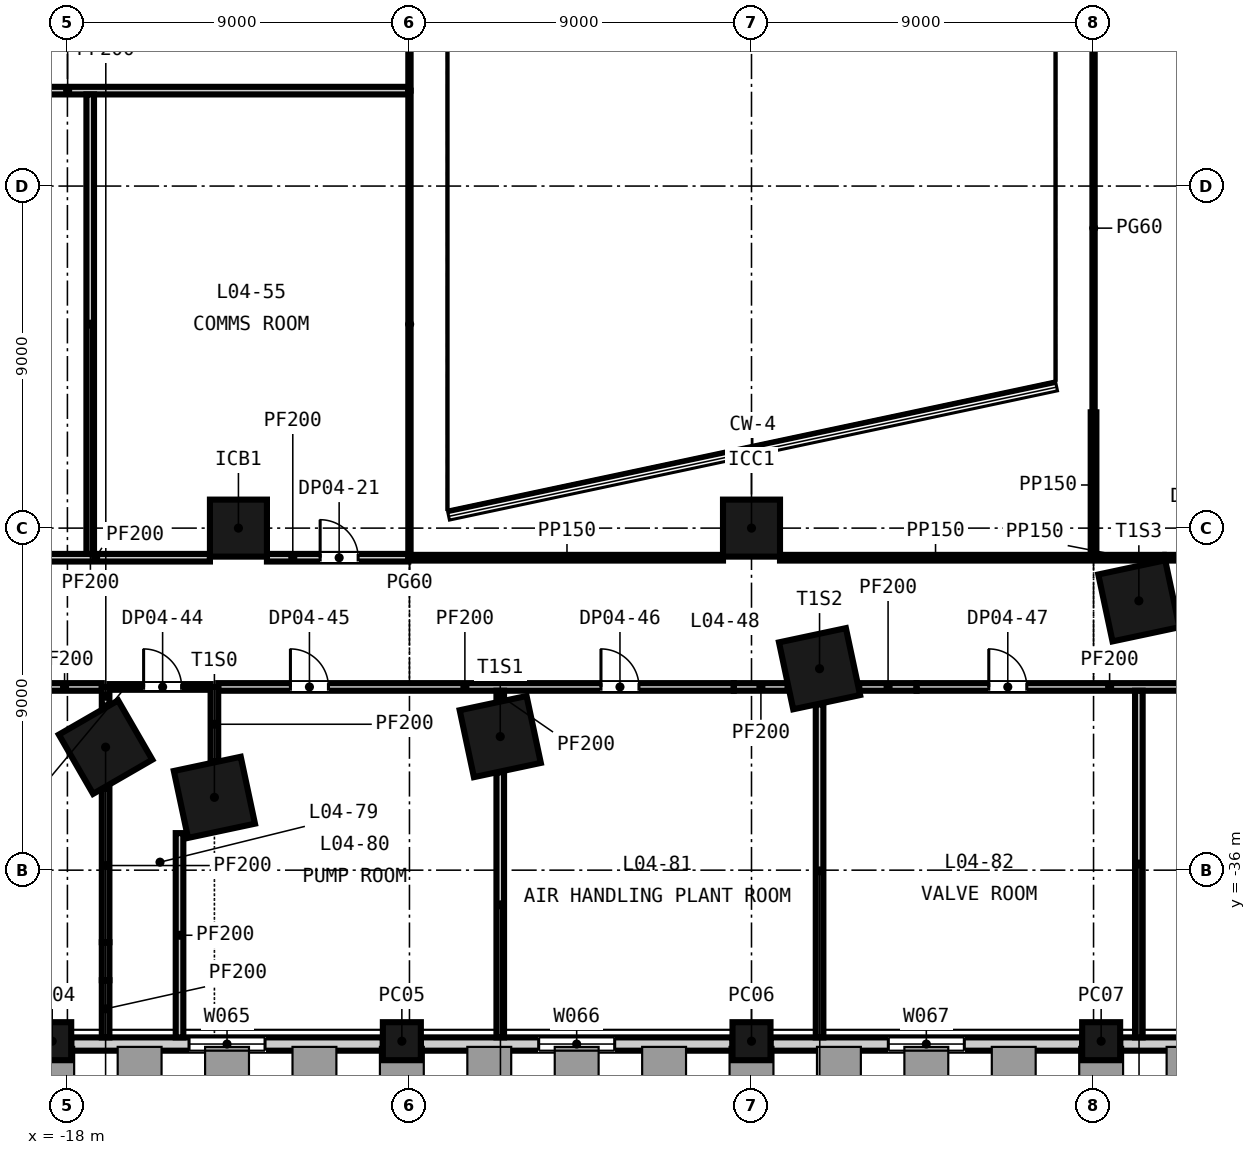
"""IFC4 building model, lengths in metres.
Left out: names, types, materials, properties, quantities, classifications, styles, units other than length and angle.
Written with IfcOpenShell. Run it as: python <this file> out.ifc"""

import sys

from ifc_helpers import new_model, si_unit, direction, frame, frame_2d, origin, origin_2d, place, context, subcontext, project, spatial, rectangle, extrude, element, fill, save


model = new_model("IFC4")
c1 = context("Model", 3, precision=1e-05, world=origin(), true_north=direction((0.0, 1.0)))
c2 = subcontext(c1, "Body", "Model", "MODEL_VIEW")
j1 = project(units=[si_unit("LENGTHUNIT", "METRE"), si_unit("PLANEANGLEUNIT", "RADIAN")], contexts=[c1])
p1 = place(None, origin())
s1 = spatial("IfcSite", under=j1, at=p1, CompositionType="ELEMENT")
p2 = place(p1, origin())
s2 = spatial("IfcBuilding", under=s1, at=p2, CompositionType="ELEMENT")
p3 = place(p2, frame((0.0, 0.0, 27.0)))
s3 = spatial("IfcBuildingStorey", under=s2, at=p3, CompositionType="ELEMENT", Elevation=27.0)
for number, where, z_axis, x_axis in (
    (1, (-16.995, -32.763, -0.3), (0.0, 0.0, 1.0), (0.5, -0.866, 0.0)),
    (2, (-14.132, -34.084, -0.3), (0.0, 0.0, 1.0), (0.978, 0.208, 0.0)),
    (3, (-6.611, -32.485, -0.3), (0.0, 0.0, 1.0), (0.978, 0.208, 0.0)),
    (4, (1.791, -30.699, -0.3), (0.0, 0.0, 1.0), (0.978, 0.208, 0.0)),
    (5, (10.192, -28.914, -0.3), (0.0, 0.0, 1.0), (0.978, 0.208, 0.0)),
):
    element("IfcColumn", number, at=place(p3, frame(where, z_axis=z_axis, x_axis=x_axis)), inside=s3, PredefinedType="COLUMN", context=c2, shape_type="SweptSolid", body=[
        extrude(rectangle(XDim=1.8, YDim=1.8, at=origin_2d()), origin(), (0.0, 0.0, 1.0), 4.5),
    ])
for number, where, z_axis, x_axis in (
    (6, (-13.5, -27.0, -0.3), (0.0, 0.0, 1.0), (1.0, 0.0, 0.0)),
    (7, (0.0, -27.0, -0.3), (0.0, 0.0, 1.0), (1.0, 0.0, 0.0)),
):
    element("IfcColumn", number, at=place(p3, frame(where, z_axis=z_axis, x_axis=x_axis)), inside=s3, PredefinedType="COLUMN", context=c2, shape_type="SweptSolid", body=[
        extrude(rectangle(XDim=1.5, YDim=1.5, at=origin_2d()), origin(), (0.0, 0.0, 1.0), 4.5),
    ])
for number, where, z_axis, x_axis in (
    (8, (-18.4, -40.5, -0.3), (0.0, 0.0, 1.0), (1.0, 0.0, 0.0)),
    (9, (-9.2, -40.5, -0.3), (0.0, 0.0, 1.0), (1.0, 0.0, 0.0)),
    (10, (0.0, -40.5, -0.3), (0.0, 0.0, 1.0), (1.0, 0.0, 0.0)),
    (11, (9.2, -40.5, -0.3), (0.0, 0.0, 1.0), (1.0, 0.0, 0.0)),
):
    element("IfcColumn", number, at=place(p3, frame(where, z_axis=z_axis, x_axis=x_axis)), inside=s3, PredefinedType="COLUMN", context=c2, shape_type="SweptSolid", body=[
        extrude(rectangle(XDim=1.0, YDim=1.0, at=origin_2d()), origin(), (0.0, 0.0, 1.0), 4.5),
    ])
p4 = place(p3, frame((-17.9, -40.575, -0.3), z_axis=(0.0, 0.0, 1.0), x_axis=(1.0, 0.0, 0.0)))
e12 = element("IfcWall", 12, at=p4, inside=s3, PredefinedType="SOLIDWALL", context=c2, shape_type="SweptSolid", body=[
    extrude(rectangle(XDim=8.2, YDim=0.35, at=frame_2d((4.1, 0.0))), origin(), (0.0, 0.0, 1.0), 3.6),
])
p5 = place(p4, frame((3.1, 0.0, 1.2)))
e13 = element("IfcOpeningElement", 13, at=p5, cuts=e12, PredefinedType="OPENING", context=c2, shape_type="SweptSolid", body=[
    extrude(rectangle(XDim=2.0, YDim=2.35, at=frame_2d((1.0, 1.175))), frame((0.0, 0.185, 0.0), z_axis=(0.0, -1.0, 0.0), x_axis=(1.0, 0.0, 0.0)), (0.0, 0.0, 1.0), 0.37),
])
p6 = place(p3, frame((-8.7, -40.575, -0.3), z_axis=(0.0, 0.0, 1.0), x_axis=(1.0, 0.0, 0.0)))
e14 = element("IfcWall", 14, at=p6, inside=s3, PredefinedType="SOLIDWALL", context=c2, shape_type="SweptSolid", body=[
    extrude(rectangle(XDim=8.2, YDim=0.35, at=frame_2d((4.1, 0.0))), origin(), (0.0, 0.0, 1.0), 3.6),
])
p7 = place(p6, frame((3.1, 0.0, 1.2)))
e15 = element("IfcOpeningElement", 15, at=p7, cuts=e14, PredefinedType="OPENING", context=c2, shape_type="SweptSolid", body=[
    extrude(rectangle(XDim=2.0, YDim=2.35, at=frame_2d((1.0, 1.175))), frame((0.0, 0.185, 0.0), z_axis=(0.0, -1.0, 0.0), x_axis=(1.0, 0.0, 0.0)), (0.0, 0.0, 1.0), 0.37),
])
p8 = place(p3, frame((0.5, -40.575, -0.3), z_axis=(0.0, 0.0, 1.0), x_axis=(1.0, 0.0, 0.0)))
e16 = element("IfcWall", 16, at=p8, inside=s3, PredefinedType="SOLIDWALL", context=c2, shape_type="SweptSolid", body=[
    extrude(rectangle(XDim=8.2, YDim=0.35, at=frame_2d((4.1, 0.0))), origin(), (0.0, 0.0, 1.0), 3.6),
])
p9 = place(p8, frame((3.1, 0.0, 1.2)))
e17 = element("IfcOpeningElement", 17, at=p9, cuts=e16, PredefinedType="OPENING", context=c2, shape_type="SweptSolid", body=[
    extrude(rectangle(XDim=2.0, YDim=2.35, at=frame_2d((1.0, 1.175))), frame((0.0, 0.185, 0.0), z_axis=(0.0, -1.0, 0.0), x_axis=(1.0, 0.0, 0.0)), (0.0, 0.0, 1.0), 0.37),
])
p10 = place(p3, frame((9.7, -40.575, -0.3), z_axis=(0.0, 0.0, 1.0), x_axis=(1.0, 0.0, 0.0)))
e18 = element("IfcWall", 18, at=p10, inside=s3, PredefinedType="SOLIDWALL", context=c2, shape_type="SweptSolid", body=[
    extrude(rectangle(XDim=8.2, YDim=0.35, at=frame_2d((4.1, 0.0))), origin(), (0.0, 0.0, 1.0), 3.6),
])
p11 = place(p10, frame((3.1, 0.0, 1.2)))
e19 = element("IfcOpeningElement", 19, at=p11, cuts=e18, PredefinedType="OPENING", context=c2, shape_type="SweptSolid", body=[
    extrude(rectangle(XDim=2.0, YDim=2.35, at=frame_2d((1.0, 1.175))), frame((0.0, 0.185, 0.0), z_axis=(0.0, -1.0, 0.0), x_axis=(1.0, 0.0, 0.0)), (0.0, 0.0, 1.0), 0.37),
])
p12 = place(p3, frame((-19.065, -31.179, 0.0), z_axis=(0.0, 0.0, 1.0), x_axis=(1.0, 0.0, 0.0)))
e20 = element("IfcWall", 20, at=p12, inside=s3, PredefinedType="PARTITIONING", context=c2, shape_type="SweptSolid", body=[
    extrude(rectangle(XDim=1.97, YDim=0.2, at=frame_2d((0.985, 0.0))), origin(), (0.0, 0.0, 1.0), 3.2),
])
p13 = place(p3, frame((-16.895, -31.179, 0.0), z_axis=(0.0, 0.0, 1.0), x_axis=(1.0, 0.0, 0.0)))
e21 = element("IfcWall", 21, at=p13, inside=s3, PredefinedType="PARTITIONING", context=c2, shape_type="SweptSolid", body=[
    extrude(rectangle(XDim=2.663, YDim=0.15, at=frame_2d((1.332, 0.0))), origin(), (0.0, 0.0, 1.0), 4.2),
])
p14 = place(p13, frame((0.9, 0.0, 0.0)))
e22 = element("IfcOpeningElement", 22, at=p14, cuts=e21, PredefinedType="OPENING", context=c2, shape_type="SweptSolid", body=[
    extrude(rectangle(XDim=1.0, YDim=2.1, at=frame_2d((0.5, 1.05))), frame((0.0, 0.085, 0.0), z_axis=(0.0, -1.0, 0.0), x_axis=(1.0, 0.0, 0.0)), (0.0, 0.0, 1.0), 0.17),
])
p15 = place(p3, frame((-14.032, -31.179, 0.0), z_axis=(0.0, 0.0, 1.0), x_axis=(1.0, 0.0, 0.0)))
e23 = element("IfcWall", 23, at=p15, inside=s3, PredefinedType="PARTITIONING", context=c2, shape_type="SweptSolid", body=[
    extrude(rectangle(XDim=13.566, YDim=0.2, at=frame_2d((6.783, 0.0))), origin(), (0.0, 0.0, 1.0), 4.2),
])
p16 = place(p15, frame((1.9, 0.0, 0.0)))
e24 = element("IfcOpeningElement", 24, at=p16, cuts=e23, PredefinedType="OPENING", context=c2, shape_type="SweptSolid", body=[
    extrude(rectangle(XDim=1.0, YDim=2.1, at=frame_2d((0.5, 1.05))), frame((0.0, 0.11, 0.0), z_axis=(0.0, -1.0, 0.0), x_axis=(1.0, 0.0, 0.0)), (0.0, 0.0, 1.0), 0.22),
])
p17 = place(p15, frame((10.071, 0.0, 0.0)))
e25 = element("IfcOpeningElement", 25, at=p17, cuts=e23, PredefinedType="OPENING", context=c2, shape_type="SweptSolid", body=[
    extrude(rectangle(XDim=1.0, YDim=2.1, at=frame_2d((0.5, 1.05))), frame((0.0, 0.11, 0.0), z_axis=(0.0, -1.0, 0.0), x_axis=(1.0, 0.0, 0.0)), (0.0, 0.0, 1.0), 0.22),
])
p18 = place(p3, frame((-0.466, -31.179, 0.0), z_axis=(0.0, 0.0, 1.0), x_axis=(1.0, 0.0, 0.0)))
e26 = element("IfcWall", 26, at=p18, inside=s3, PredefinedType="PARTITIONING", context=c2, shape_type="SweptSolid", body=[
    extrude(rectangle(XDim=1.417, YDim=0.2, at=frame_2d((0.709, 0.0))), origin(), (0.0, 0.0, 1.0), 3.2),
])
p19 = place(p3, frame((2.834, -31.179, 0.0), z_axis=(0.0, 0.0, 1.0), x_axis=(1.0, 0.0, 0.0)))
e27 = element("IfcWall", 27, at=p19, inside=s3, PredefinedType="PARTITIONING", context=c2, shape_type="SweptSolid", body=[
    extrude(rectangle(XDim=1.51, YDim=0.2, at=frame_2d((0.755, 0.0))), origin(), (0.0, 0.0, 1.0), 3.2),
])
p20 = place(p3, frame((4.344, -31.179, 0.0), z_axis=(0.0, 0.0, 1.0), x_axis=(1.0, 0.0, 0.0)))
e28 = element("IfcWall", 28, at=p20, inside=s3, PredefinedType="PARTITIONING", context=c2, shape_type="SweptSolid", body=[
    extrude(rectangle(XDim=9.718, YDim=0.2, at=frame_2d((4.859, 0.0))), origin(), (0.0, 0.0, 1.0), 4.2),
])
p21 = place(p20, frame((1.9, 0.0, 0.0)))
e29 = element("IfcOpeningElement", 29, at=p21, cuts=e28, PredefinedType="OPENING", context=c2, shape_type="SweptSolid", body=[
    extrude(rectangle(XDim=1.0, YDim=2.1, at=frame_2d((0.5, 1.05))), frame((0.0, 0.11, 0.0), z_axis=(0.0, -1.0, 0.0), x_axis=(1.0, 0.0, 0.0)), (0.0, 0.0, 1.0), 0.22),
])
p22 = place(p20, frame((7.249, 0.0, 0.0)))
e30 = element("IfcOpeningElement", 30, at=p22, cuts=e28, PredefinedType="OPENING", context=c2, shape_type="SweptSolid", body=[
    extrude(rectangle(XDim=1.0, YDim=2.1, at=frame_2d((0.5, 1.05))), frame((0.0, 0.11, 0.0), z_axis=(0.0, -1.0, 0.0), x_axis=(1.0, 0.0, 0.0)), (0.0, 0.0, 1.0), 0.22),
])
p23 = place(p3, frame((-20.276, -27.779, 0.0), z_axis=(0.0, 0.0, 1.0), x_axis=(1.0, 0.0, 0.0)))
e31 = element("IfcWall", 31, at=p23, inside=s3, PredefinedType="PARTITIONING", context=c2, shape_type="SweptSolid", body=[
    extrude(rectangle(XDim=6.026, YDim=0.2, at=frame_2d((3.013, 0.0))), origin(), (0.0, 0.0, 1.0), 4.2),
])
p24 = place(p3, frame((-12.75, -27.779, 0.0), z_axis=(0.0, 0.0, 1.0), x_axis=(1.0, 0.0, 0.0)))
e32 = element("IfcWall", 32, at=p24, inside=s3, PredefinedType="PARTITIONING", context=c2, shape_type="SweptSolid", body=[
    extrude(rectangle(XDim=3.72, YDim=0.2, at=frame_2d((1.86, 0.0))), origin(), (0.0, 0.0, 1.0), 4.2),
])
p25 = place(p24, frame((1.4, 0.0, 0.0)))
e33 = element("IfcOpeningElement", 33, at=p25, cuts=e32, PredefinedType="OPENING", context=c2, shape_type="SweptSolid", body=[
    extrude(rectangle(XDim=1.0, YDim=2.1, at=frame_2d((0.5, 1.05))), frame((0.0, 0.11, 0.0), z_axis=(0.0, -1.0, 0.0), x_axis=(1.0, 0.0, 0.0)), (0.0, 0.0, 1.0), 0.22),
])
p26 = place(p3, frame((-8.97, -27.779, 0.0), z_axis=(0.0, 0.0, 1.0), x_axis=(1.0, 0.0, 0.0)))
e34 = element("IfcWall", 34, at=p26, inside=s3, PredefinedType="PARTITIONING", context=c2, shape_type="SweptSolid", body=[
    extrude(rectangle(XDim=8.22, YDim=0.15, at=frame_2d((4.11, 0.0))), origin(), (0.0, 0.0, 1.0), 4.2),
])
p27 = place(p3, frame((0.75, -27.779, 0.0), z_axis=(0.0, 0.0, 1.0), x_axis=(1.0, 0.0, 0.0)))
e35 = element("IfcWall", 35, at=p27, inside=s3, PredefinedType="PARTITIONING", context=c2, shape_type="SweptSolid", body=[
    extrude(rectangle(XDim=8.175, YDim=0.15, at=frame_2d((4.087, 0.0))), origin(), (0.0, 0.0, 1.0), 4.2),
])
p28 = place(p3, frame((9.075, -27.779, 0.0), z_axis=(0.0, 0.0, 1.0), x_axis=(1.0, 0.0, 0.0)))
e36 = element("IfcWall", 36, at=p28, inside=s3, PredefinedType="PARTITIONING", context=c2, shape_type="SweptSolid", body=[
    extrude(rectangle(XDim=1.773, YDim=0.15, at=frame_2d((0.886, 0.0))), origin(), (0.0, 0.0, 1.0), 4.2),
])
p29 = place(p3, frame((10.887, -27.779, 0.0), z_axis=(0.0, 0.0, 1.0), x_axis=(1.0, 0.0, 0.0)))
e37 = element("IfcWall", 37, at=p29, inside=s3, PredefinedType="PARTITIONING", context=c2, shape_type="SweptSolid", body=[
    extrude(rectangle(XDim=4.762, YDim=0.15, at=frame_2d((2.381, 0.0))), origin(), (0.0, 0.0, 1.0), 4.2),
])
p30 = place(p3, frame((-26.969, -15.489, 0.0), z_axis=(0.0, 0.0, 1.0), x_axis=(1.0, 0.0, 0.0)))
e38 = element("IfcWall", 38, at=p30, inside=s3, PredefinedType="PARTITIONING", context=c2, shape_type="SweptSolid", body=[
    extrude(rectangle(XDim=17.938, YDim=0.2, at=frame_2d((8.969, 0.0))), origin(), (0.0, 0.0, 1.0), 4.2),
])
p31 = place(p3, frame((-17.4, -27.679, 0.0), z_axis=(0.0, 0.0, 1.0), x_axis=(0.0, 1.0, 0.0)))
e39 = element("IfcWall", 39, at=p31, inside=s3, PredefinedType="PARTITIONING", context=c2, shape_type="SweptSolid", body=[
    extrude(rectangle(XDim=12.09, YDim=0.2, at=frame_2d((6.045, 0.0))), origin(), (0.0, 0.0, 1.0), 4.2),
])
p32 = place(p3, frame((-16.995, -40.4, 0.0), z_axis=(0.0, 0.0, 1.0), x_axis=(0.0, 1.0, 0.0)))
e40 = element("IfcWall", 40, at=p32, inside=s3, PredefinedType="PARTITIONING", context=c2, shape_type="SweptSolid", body=[
    extrude(rectangle(XDim=1.504, YDim=0.2, at=frame_2d((0.752, 0.0))), origin(), (0.0, 0.0, 1.0), 4.2),
])
p33 = place(p3, frame((-16.995, -38.896, 0.0), z_axis=(0.0, 0.0, 1.0), x_axis=(0.0, 1.0, 0.0)))
e41 = element("IfcWall", 41, at=p33, inside=s3, PredefinedType="PARTITIONING", context=c2, shape_type="SweptSolid", body=[
    extrude(rectangle(XDim=1.0, YDim=0.2, at=frame_2d((0.5, 0.0))), origin(), (0.0, 0.0, 1.0), 3.676),
])
p34 = place(p3, frame((-16.995, -37.896, 0.0), z_axis=(0.0, 0.0, 1.0), x_axis=(0.0, 1.0, 0.0)))
e42 = element("IfcWall", 42, at=p34, inside=s3, PredefinedType="PARTITIONING", context=c2, shape_type="SweptSolid", body=[
    extrude(rectangle(XDim=4.036, YDim=0.2, at=frame_2d((2.018, 0.0))), origin(), (0.0, 0.0, 1.0), 4.2),
])
p35 = place(p3, frame((-16.995, -31.666, 0.0), z_axis=(0.0, 0.0, 1.0), x_axis=(0.0, 1.0, 0.0)))
e43 = element("IfcWall", 43, at=p35, inside=s3, PredefinedType="PARTITIONING", context=c2, shape_type="SweptSolid", body=[
    extrude(rectangle(XDim=0.487, YDim=0.2, at=frame_2d((0.244, 0.0))), origin(), (0.0, 0.0, 1.0), 4.2),
])
p36 = place(p3, frame((-15.05, -40.4, 0.0), z_axis=(0.0, 0.0, 1.0), x_axis=(0.0, 1.0, 0.0)))
e44 = element("IfcWall", 44, at=p36, inside=s3, PredefinedType="PARTITIONING", context=c2, shape_type="SweptSolid", body=[
    extrude(rectangle(XDim=5.375, YDim=0.2, at=frame_2d((2.688, 0.0))), origin(), (0.0, 0.0, 1.0), 4.2),
])
p37 = place(p3, frame((-14.132, -33.142, 0.0), z_axis=(0.0, 0.0, 1.0), x_axis=(0.0, 1.0, 0.0)))
e45 = element("IfcWall", 45, at=p37, inside=s3, PredefinedType="PARTITIONING", context=c2, shape_type="SweptSolid", body=[
    extrude(rectangle(XDim=1.963, YDim=0.2, at=frame_2d((0.982, 0.0))), origin(), (0.0, 0.0, 1.0), 4.2),
])
p38 = place(p3, frame((-9.0, -27.778, 0.0), z_axis=(0.0, 0.0, 1.0), x_axis=(0.0, 1.0, 0.0)))
e46 = element("IfcWall", 46, at=p38, inside=s3, PredefinedType="PARTITIONING", context=c2, shape_type="SweptSolid", body=[
    extrude(rectangle(XDim=12.288, YDim=0.06, at=frame_2d((6.144, 0.0))), origin(), (0.0, 0.0, 1.0), 4.2),
])
p39 = place(p3, frame((-9.0, -15.489, 0.0), z_axis=(0.0, 0.0, 1.0), x_axis=(0.0, 1.0, 0.0)))
e47 = element("IfcWall", 47, at=p39, inside=s3, PredefinedType="PARTITIONING", context=c2, shape_type="SweptSolid", body=[
    extrude(rectangle(XDim=6.488, YDim=0.06, at=frame_2d((3.244, 0.0))), origin(), (0.0, 0.0, 1.0), 4.2),
])
p40 = place(p3, frame((-6.611, -40.4, 0.0), z_axis=(0.0, 0.0, 1.0), x_axis=(0.0, 1.0, 0.0)))
e48 = element("IfcWall", 48, at=p40, inside=s3, PredefinedType="PARTITIONING", context=c2, shape_type="SweptSolid", body=[
    extrude(rectangle(XDim=6.973, YDim=0.2, at=frame_2d((3.487, 0.0))), origin(), (0.0, 0.0, 1.0), 4.2),
])
p41 = place(p3, frame((-6.611, -31.544, 0.0), z_axis=(0.0, 0.0, 1.0), x_axis=(0.0, 1.0, 0.0)))
e49 = element("IfcWall", 49, at=p41, inside=s3, PredefinedType="PARTITIONING", context=c2, shape_type="SweptSolid", body=[
    extrude(rectangle(XDim=0.265, YDim=0.2, at=frame_2d((0.132, 0.0))), origin(), (0.0, 0.0, 1.0), 4.2),
])
p42 = place(p3, frame((1.791, -40.4, 0.0), z_axis=(0.0, 0.0, 1.0), x_axis=(0.0, 1.0, 0.0)))
e50 = element("IfcWall", 50, at=p42, inside=s3, PredefinedType="PARTITIONING", context=c2, shape_type="SweptSolid", body=[
    extrude(rectangle(XDim=8.759, YDim=0.2, at=frame_2d((4.38, 0.0))), origin(), (0.0, 0.0, 1.0), 4.2),
])
p43 = place(p3, frame((9.0, -27.778, 0.0), z_axis=(0.0, 0.0, 1.0), x_axis=(0.0, 1.0, 0.0)))
e51 = element("IfcWall", 51, at=p43, inside=s3, PredefinedType="PARTITIONING", context=c2, shape_type="SweptSolid", body=[
    extrude(rectangle(XDim=3.825, YDim=0.15, at=frame_2d((1.913, 0.0))), origin(), (0.0, 0.0, 1.0), 4.2),
])
p44 = place(p3, frame((9.0, -23.953, 0.0), z_axis=(0.0, 0.0, 1.0), x_axis=(0.0, 1.0, 0.0)))
e52 = element("IfcWall", 52, at=p44, inside=s3, PredefinedType="PARTITIONING", context=c2, shape_type="SweptSolid", body=[
    extrude(rectangle(XDim=9.691, YDim=0.06, at=frame_2d((4.846, 0.0))), origin(), (0.0, 0.0, 1.0), 4.2),
])
p45 = place(p3, frame((10.192, -40.4, 0.0), z_axis=(0.0, 0.0, 1.0), x_axis=(0.0, 1.0, 0.0)))
e53 = element("IfcWall", 53, at=p45, inside=s3, PredefinedType="PARTITIONING", context=c2, shape_type="SweptSolid", body=[
    extrude(rectangle(XDim=9.121, YDim=0.2, at=frame_2d((4.561, 0.0))), origin(), (0.0, 0.0, 1.0), 4.2),
])
p46 = place(p5, origin())
e54 = element("IfcWindow", 54, at=p46, inside=s3, PartitioningType="SINGLE_PANEL", PredefinedType="WINDOW", context=c2, shape_type="SweptSolid", body=[
    extrude(rectangle(XDim=2.0, YDim=2.35, at=frame_2d((1.0, 1.175))), frame((0.0, 0.03, 0.0), z_axis=(0.0, -1.0, 0.0), x_axis=(1.0, 0.0, 0.0)), (0.0, 0.0, 1.0), 0.06),
])
fill(e13, e54)
p47 = place(p7, origin())
e55 = element("IfcWindow", 55, at=p47, inside=s3, PartitioningType="SINGLE_PANEL", PredefinedType="WINDOW", context=c2, shape_type="SweptSolid", body=[
    extrude(rectangle(XDim=2.0, YDim=2.35, at=frame_2d((1.0, 1.175))), frame((0.0, 0.03, 0.0), z_axis=(0.0, -1.0, 0.0), x_axis=(1.0, 0.0, 0.0)), (0.0, 0.0, 1.0), 0.06),
])
fill(e15, e55)
p48 = place(p9, origin())
e56 = element("IfcWindow", 56, at=p48, inside=s3, PartitioningType="SINGLE_PANEL", PredefinedType="WINDOW", context=c2, shape_type="SweptSolid", body=[
    extrude(rectangle(XDim=2.0, YDim=2.35, at=frame_2d((1.0, 1.175))), frame((0.0, 0.03, 0.0), z_axis=(0.0, -1.0, 0.0), x_axis=(1.0, 0.0, 0.0)), (0.0, 0.0, 1.0), 0.06),
])
fill(e17, e56)
p49 = place(p25, origin())
e57 = element("IfcDoor", 57, at=p49, inside=s3, OperationType="SINGLE_SWING_LEFT", PredefinedType="DOOR", context=c2, shape_type="SweptSolid", body=[
    extrude(rectangle(XDim=1.0, YDim=2.1, at=frame_2d((0.5, 1.05))), frame((0.0, 0.025, 0.0), z_axis=(0.0, -1.0, 0.0), x_axis=(1.0, 0.0, 0.0)), (0.0, 0.0, 1.0), 0.05),
])
fill(e33, e57)
p50 = place(p14, origin())
e58 = element("IfcDoor", 58, at=p50, inside=s3, OperationType="SINGLE_SWING_LEFT", PredefinedType="DOOR", context=c2, shape_type="SweptSolid", body=[
    extrude(rectangle(XDim=1.0, YDim=2.1, at=frame_2d((0.5, 1.05))), frame((0.0, 0.025, 0.0), z_axis=(0.0, -1.0, 0.0), x_axis=(1.0, 0.0, 0.0)), (0.0, 0.0, 1.0), 0.05),
])
fill(e22, e58)
p51 = place(p16, origin())
e59 = element("IfcDoor", 59, at=p51, inside=s3, OperationType="SINGLE_SWING_LEFT", PredefinedType="DOOR", context=c2, shape_type="SweptSolid", body=[
    extrude(rectangle(XDim=1.0, YDim=2.1, at=frame_2d((0.5, 1.05))), frame((0.0, 0.025, 0.0), z_axis=(0.0, -1.0, 0.0), x_axis=(1.0, 0.0, 0.0)), (0.0, 0.0, 1.0), 0.05),
])
fill(e24, e59)
p52 = place(p17, origin())
e60 = element("IfcDoor", 60, at=p52, inside=s3, OperationType="SINGLE_SWING_LEFT", PredefinedType="DOOR", context=c2, shape_type="SweptSolid", body=[
    extrude(rectangle(XDim=1.0, YDim=2.1, at=frame_2d((0.5, 1.05))), frame((0.0, 0.025, 0.0), z_axis=(0.0, -1.0, 0.0), x_axis=(1.0, 0.0, 0.0)), (0.0, 0.0, 1.0), 0.05),
])
fill(e25, e60)
p53 = place(p21, origin())
e61 = element("IfcDoor", 61, at=p53, inside=s3, OperationType="SINGLE_SWING_LEFT", PredefinedType="DOOR", context=c2, shape_type="SweptSolid", body=[
    extrude(rectangle(XDim=1.0, YDim=2.1, at=frame_2d((0.5, 1.05))), frame((0.0, 0.025, 0.0), z_axis=(0.0, -1.0, 0.0), x_axis=(1.0, 0.0, 0.0)), (0.0, 0.0, 1.0), 0.05),
])
fill(e29, e61)
save(model, sys.argv[1])
